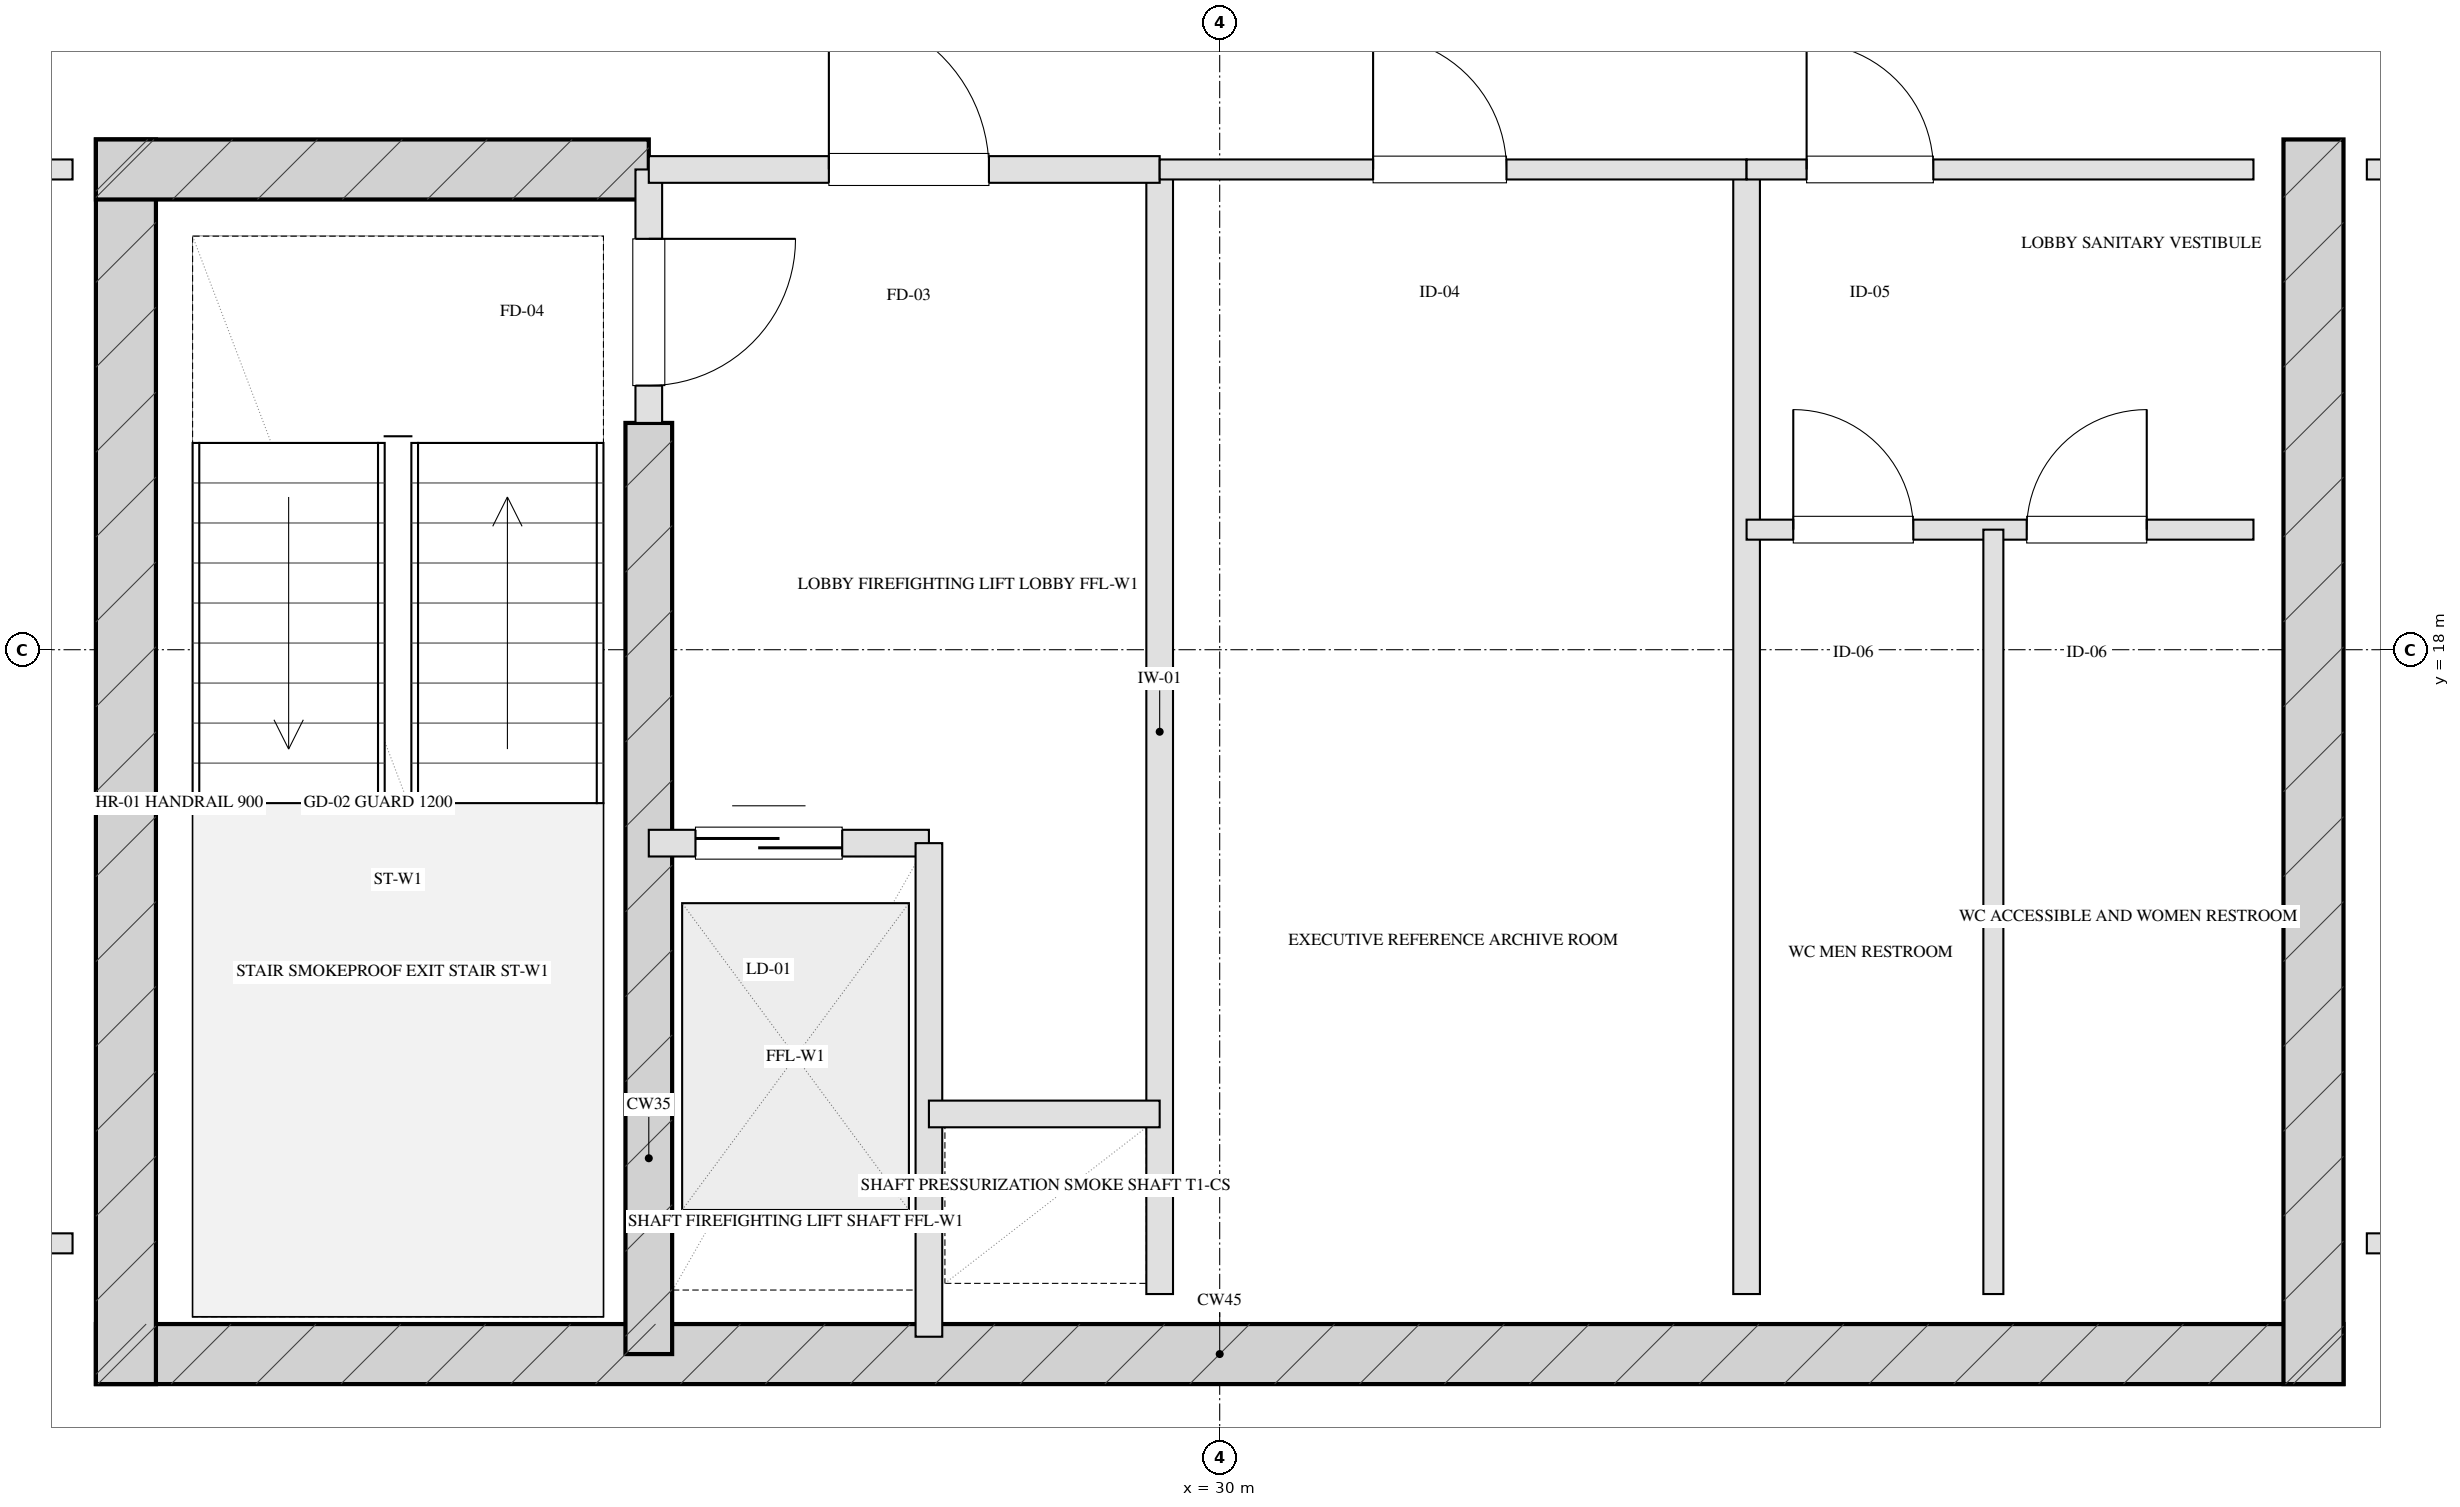
"""IFC4 building model, lengths in metres.
Left out: names, types, materials, properties, quantities, classifications, styles, units other than length and angle.
Written with IfcOpenShell. Run it as: python <this file> out.ifc"""

import sys

from ifc_helpers import new_model, si_unit, direction, frame, frame_2d, origin, place, context, subcontext, project, spatial, rectangle, extrude, element, fill, save


model = new_model("IFC4")
c1 = context("Model", 3, precision=1e-05, world=origin(), true_north=direction((0.0, 1.0)))
c2 = subcontext(c1, "Body", "Model", "MODEL_VIEW")
j1 = project(units=[si_unit("LENGTHUNIT", "METRE"), si_unit("PLANEANGLEUNIT", "RADIAN")], contexts=[c1])
p1 = place(None, origin())
s1 = spatial("IfcSite", under=j1, at=p1, CompositionType="ELEMENT")
p2 = place(p1, origin())
s2 = spatial("IfcBuilding", under=s1, at=p2, CompositionType="ELEMENT")
p3 = place(p2, frame((0.0, 0.0, 223.1)))
s3 = spatial("IfcBuildingStorey", under=s2, at=p3, CompositionType="ELEMENT", Elevation=223.1)
p4 = place(p3, frame((21.575, 12.72, 0.0), z_axis=(0.0, 0.0, 1.0), x_axis=(1.0, 0.0, 0.0)))
e1 = element("IfcWall", 1, at=p4, inside=s3, PredefinedType="SHEAR", context=c2, shape_type="SweptSolid", body=[
    extrude(rectangle(XDim=16.85, YDim=0.45, at=frame_2d((8.425, 0.0))), origin(), (0.0, 0.0, 1.0), 3.45),
])
for number, where, z_axis, x_axis in (
    (2, (21.8, 21.825, 0.0), (0.0, 0.0, 1.0), (0.0, -1.0, 0.0)),
    (3, (38.2, 21.825, 0.0), (0.0, 0.0, 1.0), (0.0, -1.0, 0.0)),
):
    element("IfcWall", number, at=place(p3, frame(where, z_axis=z_axis, x_axis=x_axis)), inside=s3, PredefinedType="SHEAR", context=c2, shape_type="SweptSolid", body=[
        extrude(rectangle(XDim=9.33, YDim=0.45, at=frame_2d((4.665, 0.0))), origin(), (0.0, 0.0, 1.0), 3.45),
    ])
p5 = place(p3, frame((25.72, 19.7, 0.0), z_axis=(0.0, 0.0, 1.0), x_axis=(0.0, -1.0, 0.0)))
e4 = element("IfcWall", 4, at=p5, inside=s3, PredefinedType="SHEAR", context=c2, shape_type="SweptSolid", body=[
    extrude(rectangle(XDim=6.98, YDim=0.35, at=frame_2d((3.49, 0.0))), origin(), (0.0, 0.0, 1.0), 3.45),
])
p6 = place(p3, frame((21.575, 21.6, 0.0), z_axis=(0.0, 0.0, 1.0), x_axis=(1.0, 0.0, 0.0)))
e5 = element("IfcWall", 5, at=p6, inside=s3, PredefinedType="SHEAR", context=c2, shape_type="SweptSolid", body=[
    extrude(rectangle(XDim=4.145, YDim=0.45, at=frame_2d((2.073, 0.0))), origin(), (0.0, 0.0, 1.0), 3.45),
])
p7 = place(p3, frame((25.72, 21.6, 0.0), z_axis=(0.0, 0.0, 1.0), x_axis=(0.0, -1.0, 0.0)))
e6 = element("IfcWall", 6, at=p7, inside=s3, PredefinedType="PARTITIONING", context=c2, shape_type="SweptSolid", body=[
    extrude(rectangle(XDim=1.9, YDim=0.2, at=frame_2d((0.95, 0.0))), origin(), (0.0, 0.0, 1.0), 3.175),
])
p8 = place(p7, frame((0.52, 0.0, 0.0)))
e7 = element("IfcOpeningElement", 7, at=p8, cuts=e6, PredefinedType="OPENING", context=c2, shape_type="SweptSolid", body=[
    extrude(rectangle(XDim=1.1, YDim=2.05, at=frame_2d((0.55, 1.025))), frame((0.0, 0.11, 0.0), z_axis=(0.0, -1.0, 0.0), x_axis=(1.0, 0.0, 0.0)), (0.0, 0.0, 1.0), 0.22),
])
p9 = place(p3, frame((29.55, 21.6, 0.0), z_axis=(0.0, 0.0, 1.0), x_axis=(0.0, -1.0, 0.0)))
e8 = element("IfcWall", 8, at=p9, inside=s3, PredefinedType="PARTITIONING", context=c2, shape_type="SweptSolid", body=[
    extrude(rectangle(XDim=8.43, YDim=0.2, at=frame_2d((4.215, 0.0))), origin(), (0.0, 0.0, 1.0), 3.175),
])
p10 = place(p3, frame((25.72, 21.6, 0.0), z_axis=(0.0, 0.0, 1.0), x_axis=(1.0, 0.0, 0.0)))
e9 = element("IfcWall", 9, at=p10, inside=s3, PredefinedType="PARTITIONING", context=c2, shape_type="SweptSolid", body=[
    extrude(rectangle(XDim=3.83, YDim=0.2, at=frame_2d((1.915, 0.0))), origin(), (0.0, 0.0, 1.0), 3.175),
])
p11 = place(p10, frame((1.35, 0.0, 0.0)))
e10 = element("IfcOpeningElement", 10, at=p11, cuts=e9, PredefinedType="OPENING", context=c2, shape_type="SweptSolid", body=[
    extrude(rectangle(XDim=1.2, YDim=2.05, at=frame_2d((0.6, 1.025))), frame((0.0, 0.11, 0.0), z_axis=(0.0, -1.0, 0.0), x_axis=(1.0, 0.0, 0.0)), (0.0, 0.0, 1.0), 0.22),
])
p12 = place(p3, frame((25.72, 16.55, 0.0), z_axis=(0.0, 0.0, 1.0), x_axis=(1.0, 0.0, 0.0)))
e11 = element("IfcWall", 11, at=p12, inside=s3, PredefinedType="PARTITIONING", context=c2, shape_type="SweptSolid", body=[
    extrude(rectangle(XDim=2.1, YDim=0.2, at=frame_2d((1.05, 0.0))), origin(), (0.0, 0.0, 1.0), 3.175),
])
p13 = place(p12, frame((0.35, 0.0, 0.0)))
e12 = element("IfcOpeningElement", 12, at=p13, cuts=e11, PredefinedType="OPENING", context=c2, shape_type="SweptSolid", body=[
    extrude(rectangle(XDim=1.1, YDim=2.05, at=frame_2d((0.55, 1.025))), frame((0.0, 0.11, 0.0), z_axis=(0.0, -1.0, 0.0), x_axis=(1.0, 0.0, 0.0)), (0.0, 0.0, 1.0), 0.22),
])
p14 = place(p3, frame((27.82, 16.55, 0.0), z_axis=(0.0, 0.0, 1.0), x_axis=(0.0, -1.0, 0.0)))
e13 = element("IfcWall", 13, at=p14, inside=s3, PredefinedType="PARTITIONING", context=c2, shape_type="SweptSolid", body=[
    extrude(rectangle(XDim=3.7, YDim=0.2, at=frame_2d((1.85, 0.0))), origin(), (0.0, 0.0, 1.0), 3.175),
])
p15 = place(p3, frame((27.82, 14.52, 0.0), z_axis=(0.0, 0.0, 1.0), x_axis=(1.0, 0.0, 0.0)))
e14 = element("IfcWall", 14, at=p15, inside=s3, PredefinedType="PARTITIONING", context=c2, shape_type="SweptSolid", body=[
    extrude(rectangle(XDim=1.73, YDim=0.2, at=frame_2d((0.865, 0.0))), origin(), (0.0, 0.0, 1.0), 3.175),
])
p16 = place(p3, frame((33.95, 21.6, 0.0), z_axis=(0.0, 0.0, 1.0), x_axis=(0.0, -1.0, 0.0)))
e15 = element("IfcWall", 15, at=p16, inside=s3, PredefinedType="PARTITIONING", context=c2, shape_type="SweptSolid", body=[
    extrude(rectangle(XDim=8.43, YDim=0.2, at=frame_2d((4.215, 0.0))), origin(), (0.0, 0.0, 1.0), 3.175),
])
p17 = place(p3, frame((29.55, 21.6, 0.0), z_axis=(0.0, 0.0, 1.0), x_axis=(1.0, 0.0, 0.0)))
e16 = element("IfcWall", 16, at=p17, inside=s3, PredefinedType="PARTITIONING", context=c2, shape_type="SweptSolid", body=[
    extrude(rectangle(XDim=4.4, YDim=0.15, at=frame_2d((2.2, 0.0))), origin(), (0.0, 0.0, 1.0), 3.175),
])
p18 = place(p17, frame((1.6, 0.0, 0.0)))
e17 = element("IfcOpeningElement", 17, at=p18, cuts=e16, PredefinedType="OPENING", context=c2, shape_type="SweptSolid", body=[
    extrude(rectangle(XDim=1.0, YDim=2.05, at=frame_2d((0.5, 1.025))), frame((0.0, 0.085, 0.0), z_axis=(0.0, -1.0, 0.0), x_axis=(1.0, 0.0, 0.0)), (0.0, 0.0, 1.0), 0.17),
])
p19 = place(p3, frame((33.95, 21.6, 0.0), z_axis=(0.0, 0.0, 1.0), x_axis=(1.0, 0.0, 0.0)))
e18 = element("IfcWall", 18, at=p19, inside=s3, PredefinedType="PARTITIONING", context=c2, shape_type="SweptSolid", body=[
    extrude(rectangle(XDim=3.8, YDim=0.15, at=frame_2d((1.9, 0.0))), origin(), (0.0, 0.0, 1.0), 3.175),
])
p20 = place(p19, frame((0.45, 0.0, 0.0)))
e19 = element("IfcOpeningElement", 19, at=p20, cuts=e18, PredefinedType="OPENING", context=c2, shape_type="SweptSolid", body=[
    extrude(rectangle(XDim=0.95, YDim=2.05, at=frame_2d((0.475, 1.025))), frame((0.0, 0.085, 0.0), z_axis=(0.0, -1.0, 0.0), x_axis=(1.0, 0.0, 0.0)), (0.0, 0.0, 1.0), 0.17),
])
p21 = place(p3, frame((33.95, 18.9, 0.0), z_axis=(0.0, 0.0, 1.0), x_axis=(1.0, 0.0, 0.0)))
e20 = element("IfcWall", 20, at=p21, inside=s3, PredefinedType="PARTITIONING", context=c2, shape_type="SweptSolid", body=[
    extrude(rectangle(XDim=3.8, YDim=0.15, at=frame_2d((1.9, 0.0))), origin(), (0.0, 0.0, 1.0), 3.175),
])
p22 = place(p21, frame((0.35, 0.0, 0.0)))
e21 = element("IfcOpeningElement", 21, at=p22, cuts=e20, PredefinedType="OPENING", context=c2, shape_type="SweptSolid", body=[
    extrude(rectangle(XDim=0.9, YDim=2.05, at=frame_2d((0.45, 1.025))), frame((0.0, 0.085, 0.0), z_axis=(0.0, -1.0, 0.0), x_axis=(1.0, 0.0, 0.0)), (0.0, 0.0, 1.0), 0.17),
])
p23 = place(p21, frame((2.1, 0.0, 0.0)))
e22 = element("IfcOpeningElement", 22, at=p23, cuts=e20, PredefinedType="OPENING", context=c2, shape_type="SweptSolid", body=[
    extrude(rectangle(XDim=0.9, YDim=2.05, at=frame_2d((0.45, 1.025))), frame((0.0, 0.085, 0.0), z_axis=(0.0, -1.0, 0.0), x_axis=(1.0, 0.0, 0.0)), (0.0, 0.0, 1.0), 0.17),
])
p24 = place(p3, frame((35.8, 18.9, 0.0), z_axis=(0.0, 0.0, 1.0), x_axis=(0.0, -1.0, 0.0)))
e23 = element("IfcWall", 23, at=p24, inside=s3, PredefinedType="PARTITIONING", context=c2, shape_type="SweptSolid", body=[
    extrude(rectangle(XDim=5.73, YDim=0.15, at=frame_2d((2.865, 0.0))), origin(), (0.0, 0.0, 1.0), 3.175),
])
p25 = place(p3, frame((15.0, 13.55, 0.0), z_axis=(0.0, 0.0, 1.0), x_axis=(1.0, 0.0, 0.0)))
e24 = element("IfcWall", 24, at=p25, inside=s3, PredefinedType="PARTITIONING", context=c2, shape_type="SweptSolid", body=[
    extrude(rectangle(XDim=6.4, YDim=0.15, at=frame_2d((3.2, 0.0))), origin(), (0.0, 0.0, 1.0), 3.175),
])
p26 = place(p3, frame((15.0, 21.6, 0.0), z_axis=(0.0, 0.0, 1.0), x_axis=(1.0, 0.0, 0.0)))
e25 = element("IfcWall", 25, at=p26, inside=s3, PredefinedType="PARTITIONING", context=c2, shape_type="SweptSolid", body=[
    extrude(rectangle(XDim=6.4, YDim=0.15, at=frame_2d((3.2, 0.0))), origin(), (0.0, 0.0, 1.0), 3.175),
])
p27 = place(p26, frame((2.688, 0.0, 0.0)))
e26 = element("IfcOpeningElement", 26, at=p27, cuts=e25, PredefinedType="OPENING", context=c2, shape_type="SweptSolid", body=[
    extrude(rectangle(XDim=1.0, YDim=2.05, at=frame_2d((0.5, 1.025))), frame((0.0, 0.085, 0.0), z_axis=(0.0, -1.0, 0.0), x_axis=(1.0, 0.0, 0.0)), (0.0, 0.0, 1.0), 0.17),
])
p28 = place(p3, frame((38.6, 13.55, 0.0), z_axis=(0.0, 0.0, 1.0), x_axis=(1.0, 0.0, 0.0)))
e27 = element("IfcWall", 27, at=p28, inside=s3, PredefinedType="PARTITIONING", context=c2, shape_type="SweptSolid", body=[
    extrude(rectangle(XDim=6.4, YDim=0.15, at=frame_2d((3.2, 0.0))), origin(), (0.0, 0.0, 1.0), 3.175),
])
p29 = place(p3, frame((38.6, 21.6, 0.0), z_axis=(0.0, 0.0, 1.0), x_axis=(1.0, 0.0, 0.0)))
e28 = element("IfcWall", 28, at=p29, inside=s3, PredefinedType="PARTITIONING", context=c2, shape_type="SweptSolid", body=[
    extrude(rectangle(XDim=6.4, YDim=0.15, at=frame_2d((3.2, 0.0))), origin(), (0.0, 0.0, 1.0), 3.175),
])
p30 = place(p29, frame((2.688, 0.0, 0.0)))
e29 = element("IfcOpeningElement", 29, at=p30, cuts=e28, PredefinedType="OPENING", context=c2, shape_type="SweptSolid", body=[
    extrude(rectangle(XDim=1.0, YDim=2.05, at=frame_2d((0.5, 1.025))), frame((0.0, 0.085, 0.0), z_axis=(0.0, -1.0, 0.0), x_axis=(1.0, 0.0, 0.0)), (0.0, 0.0, 1.0), 0.17),
])
p31 = place(p8, origin())
e30 = element("IfcDoor", 30, at=p31, inside=s3, OperationType="SINGLE_SWING_LEFT", PredefinedType="DOOR", context=c2, shape_type="SweptSolid", body=[
    extrude(rectangle(XDim=1.1, YDim=2.05, at=frame_2d((0.55, 1.025))), frame((0.0, 0.025, 0.0), z_axis=(0.0, -1.0, 0.0), x_axis=(1.0, 0.0, 0.0)), (0.0, 0.0, 1.0), 0.05),
])
fill(e7, e30)
p32 = place(p11, origin())
e31 = element("IfcDoor", 31, at=p32, inside=s3, OperationType="SINGLE_SWING_LEFT", PredefinedType="DOOR", context=c2, shape_type="SweptSolid", body=[
    extrude(rectangle(XDim=1.2, YDim=2.05, at=frame_2d((0.6, 1.025))), frame((0.0, 0.025, 0.0), z_axis=(0.0, -1.0, 0.0), x_axis=(1.0, 0.0, 0.0)), (0.0, 0.0, 1.0), 0.05),
])
fill(e10, e31)
p33 = place(p13, origin())
e32 = element("IfcDoor", 32, at=p33, inside=s3, OperationType="DOUBLE_DOOR_SLIDING", PredefinedType="DOOR", context=c2, shape_type="SweptSolid", body=[
    extrude(rectangle(XDim=1.1, YDim=2.05, at=frame_2d((0.55, 1.025))), frame((0.0, 0.025, 0.0), z_axis=(0.0, -1.0, 0.0), x_axis=(1.0, 0.0, 0.0)), (0.0, 0.0, 1.0), 0.05),
])
fill(e12, e32)
p34 = place(p18, origin())
e33 = element("IfcDoor", 33, at=p34, inside=s3, OperationType="SINGLE_SWING_LEFT", PredefinedType="DOOR", context=c2, shape_type="SweptSolid", body=[
    extrude(rectangle(XDim=1.0, YDim=2.05, at=frame_2d((0.5, 1.025))), frame((0.0, 0.025, 0.0), z_axis=(0.0, -1.0, 0.0), x_axis=(1.0, 0.0, 0.0)), (0.0, 0.0, 1.0), 0.05),
])
fill(e17, e33)
p35 = place(p20, origin())
e34 = element("IfcDoor", 34, at=p35, inside=s3, OperationType="SINGLE_SWING_LEFT", PredefinedType="DOOR", context=c2, shape_type="SweptSolid", body=[
    extrude(rectangle(XDim=0.95, YDim=2.05, at=frame_2d((0.475, 1.025))), frame((0.0, 0.025, 0.0), z_axis=(0.0, -1.0, 0.0), x_axis=(1.0, 0.0, 0.0)), (0.0, 0.0, 1.0), 0.05),
])
fill(e19, e34)
p36 = place(p22, origin())
e35 = element("IfcDoor", 35, at=p36, inside=s3, OperationType="SINGLE_SWING_LEFT", PredefinedType="DOOR", context=c2, shape_type="SweptSolid", body=[
    extrude(rectangle(XDim=0.9, YDim=2.05, at=frame_2d((0.45, 1.025))), frame((0.0, 0.025, 0.0), z_axis=(0.0, -1.0, 0.0), x_axis=(1.0, 0.0, 0.0)), (0.0, 0.0, 1.0), 0.05),
])
fill(e21, e35)
p37 = place(p23, origin())
e36 = element("IfcDoor", 36, at=p37, inside=s3, OperationType="SINGLE_SWING_RIGHT", PredefinedType="DOOR", context=c2, shape_type="SweptSolid", body=[
    extrude(rectangle(XDim=0.9, YDim=2.05, at=frame_2d((0.45, 1.025))), frame((0.0, 0.025, 0.0), z_axis=(0.0, -1.0, 0.0), x_axis=(1.0, 0.0, 0.0)), (0.0, 0.0, 1.0), 0.05),
])
fill(e22, e36)
save(model, sys.argv[1])
